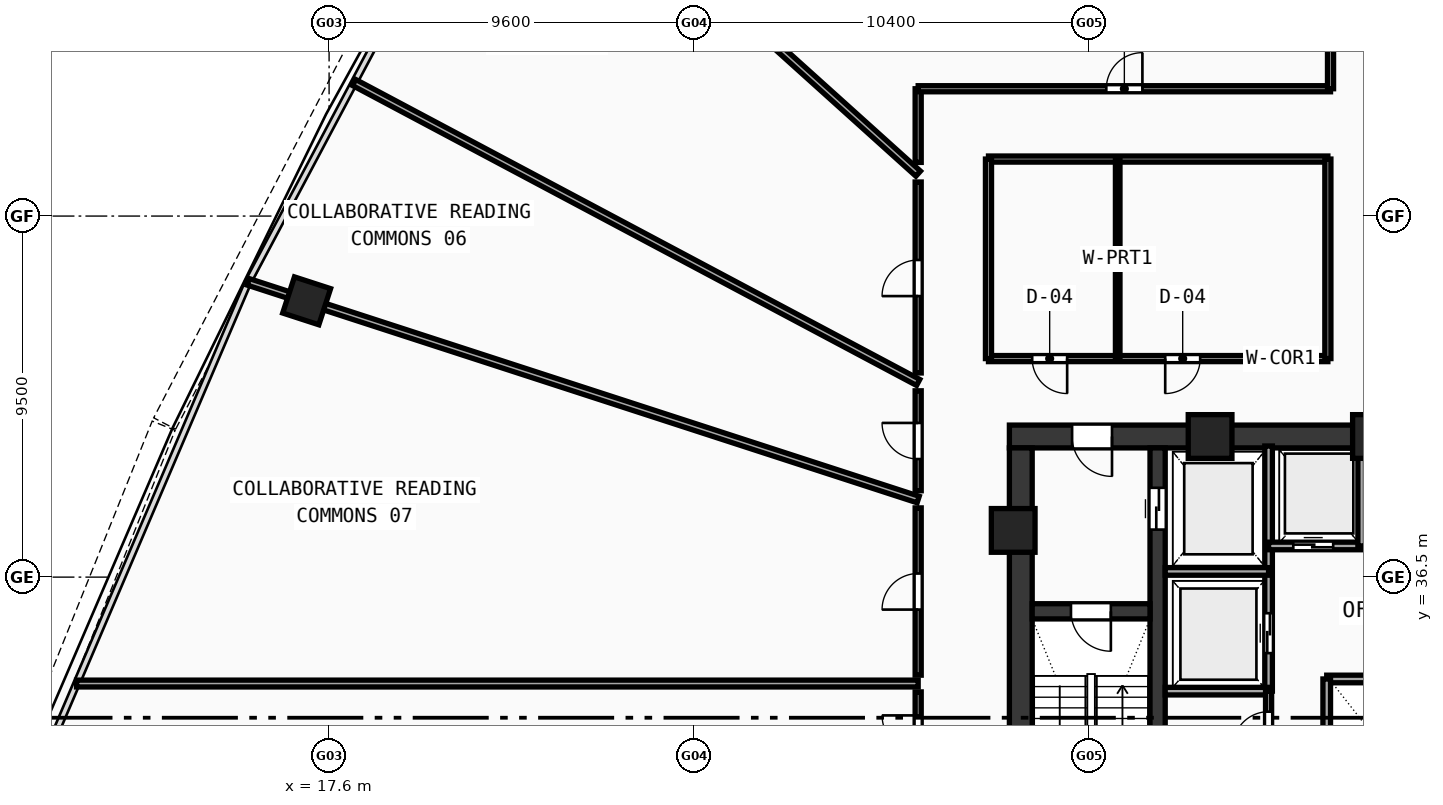
"""IFC4 building model, lengths in metres.
Left out: names, types, materials, properties, quantities, classifications, styles, units other than length and angle.
Written with IfcOpenShell. Run it as: python <this file> out.ifc"""

import sys

from ifc_helpers import new_model, si_unit, direction, frame, frame_2d, origin, origin_with_axes, origin_2d, place, context, subcontext, project, spatial, rectangle, hollow_rectangle, extrude, source, transform, mapped, element, fill, save


model = new_model("IFC4")
c1 = context("Model", 3, precision=1e-05, world=origin(), true_north=direction((0.0, 1.0)))
c2 = subcontext(c1, "Body", "Model", "MODEL_VIEW")
j1 = project(units=[si_unit("LENGTHUNIT", "METRE"), si_unit("PLANEANGLEUNIT", "RADIAN")], contexts=[c1])
p1 = place(None, origin())
s1 = spatial("IfcSite", under=j1, at=p1, CompositionType="ELEMENT")
p2 = place(p1, origin())
s2 = spatial("IfcBuilding", under=s1, at=p2, CompositionType="ELEMENT")
p3 = place(p2, frame((0.0, 0.0, 103.98)))
s3 = spatial("IfcBuildingStorey", under=s2, at=p3, CompositionType="ELEMENT", Elevation=103.98)
p4 = place(p3, frame((35.5, 40.2, 0.0), z_axis=(0.0, 0.0, 1.0), x_axis=(1.0, 0.0, 0.0)))
e1 = element("IfcWall", 1, at=p4, inside=s3, PredefinedType="SHEAR", context=c2, shape_type="SweptSolid", body=[
    extrude(rectangle(XDim=11.3, YDim=0.6, at=frame_2d((5.65, 0.0))), origin(), (0.0, 0.0, 1.0), 3.54),
])
p5 = place(p4, frame((1.65, 0.0, 0.0)))
e2 = element("IfcOpeningElement", 2, at=p5, cuts=e1, PredefinedType="OPENING", context=c2, shape_type="SweptSolid", body=[
    extrude(rectangle(XDim=1.05, YDim=2.1, at=frame_2d((0.525, 1.05))), frame((0.0, 0.31, 0.0), z_axis=(0.0, -1.0, 0.0), x_axis=(1.0, 0.0, 0.0)), (0.0, 0.0, 1.0), 0.62),
])
p6 = place(p3, frame((35.8, 27.8, 0.0), z_axis=(0.0, 0.0, 1.0), x_axis=(0.0, 1.0, 0.0)))
e3 = element("IfcWall", 3, at=p6, inside=s3, PredefinedType="SHEAR", context=c2, shape_type="SweptSolid", body=[
    extrude(rectangle(XDim=12.1, YDim=0.6, at=frame_2d((6.05, 0.0))), origin(), (0.0, 0.0, 1.0), 3.54),
])
p7 = place(p3, frame((39.4, 27.8, 0.0), z_axis=(0.0, 0.0, 1.0), x_axis=(0.0, 1.0, 0.0)))
e4 = element("IfcWall", 4, at=p7, inside=s3, PredefinedType="SHEAR", context=c2, shape_type="SweptSolid", body=[
    extrude(rectangle(XDim=12.1, YDim=0.4, at=frame_2d((6.05, 0.0))), origin(), (0.0, 0.0, 1.0), 3.54),
])
p8 = place(p7, frame((9.95, 0.0, 0.0)))
e5 = element("IfcOpeningElement", 5, at=p8, cuts=e4, PredefinedType="OPENING", context=c2, shape_type="SweptSolid", body=[
    extrude(rectangle(XDim=1.1, YDim=2.1, at=frame_2d((0.55, 1.05))), frame((0.0, 0.21, 0.0), z_axis=(0.0, -1.0, 0.0), x_axis=(1.0, 0.0, 0.0)), (0.0, 0.0, 1.0), 0.42),
])
p9 = place(p3, frame((36.1, 35.6, 0.0), z_axis=(0.0, 0.0, 1.0), x_axis=(1.0, 0.0, 0.0)))
e6 = element("IfcWall", 6, at=p9, inside=s3, PredefinedType="SHEAR", context=c2, shape_type="SweptSolid", body=[
    extrude(rectangle(XDim=3.1, YDim=0.4, at=frame_2d((1.55, 0.0))), origin(), (0.0, 0.0, 1.0), 3.54),
])
p10 = place(p9, frame((1.02, 0.0, 0.0)))
e7 = element("IfcOpeningElement", 7, at=p10, cuts=e6, PredefinedType="OPENING", context=c2, shape_type="SweptSolid", body=[
    extrude(rectangle(XDim=1.05, YDim=2.1, at=frame_2d((0.525, 1.05))), frame((0.0, 0.21, 0.0), z_axis=(0.0, -1.0, 0.0), x_axis=(1.0, 0.0, 0.0)), (0.0, 0.0, 1.0), 0.42),
])
m1 = source(origin(), c2, "Body", "SweptSolid", [
    extrude(hollow_rectangle(XDim=1.15, YDim=1.15, WallThickness=0.048, at=origin_2d()), origin(), (0.0, 0.0, 1.0), 3.8),
])
for number, where, z_axis, x_axis in (
    (8, (45.106, 40.2, -0.26), (0.0, 0.0, 1.0), (1.0, 0.0, 0.0)),
    (9, (40.781, 40.2, -0.26), (0.0, 0.0, 1.0), (1.0, 0.0, 0.0)),
    (10, (35.6, 37.729, -0.26), (0.0, 0.0, 1.0), (1.0, 0.0, 0.0)),
):
    element("IfcColumn", number, at=place(p3, frame(where, z_axis=z_axis, x_axis=x_axis)), inside=s3, PredefinedType="COLUMN", context=c2, shape_type="MappedRepresentation", body=[
        mapped(m1, transform((0.0, 0.0, 0.0), scale=1.0)),
    ])
m2 = source(origin(), c2, "Body", "SweptSolid", [
    extrude(hollow_rectangle(XDim=1.0, YDim=1.0, WallThickness=0.042, at=origin_2d()), origin(), (0.0, 0.0, 1.0), 3.8),
])
p11 = place(p3, frame((17.009, 43.77, -0.26), z_axis=(0.0, 0.0, 1.0), x_axis=(-0.309016994375, -0.951056516295, 0.0)))
e11 = element("IfcColumn", 11, at=p11, inside=s3, PredefinedType="COLUMN", context=c2, shape_type="MappedRepresentation", body=[
    mapped(m2, transform((0.0, 0.0, 0.0), scale=1.0)),
])
p12 = place(p3, frame((42.32, 33.5, 0.0), z_axis=(0.0, 0.0, 1.0), x_axis=(0.0, 1.0, 0.0)))
e12 = element("IfcWall", 12, at=p12, inside=s3, PredefinedType="SOLIDWALL", context=c2, shape_type="SweptSolid", body=[
    extrude(rectangle(XDim=6.45, YDim=0.2, at=frame_2d((3.225, 0.0))), origin(), (0.0, 0.0, 1.0), 3.54),
])
p13 = place(p12, frame((1.0, 0.0, 0.0)))
e13 = element("IfcOpeningElement", 13, at=p13, cuts=e12, PredefinedType="OPENING", context=c2, shape_type="SweptSolid", body=[
    extrude(rectangle(XDim=1.05, YDim=2.1, at=frame_2d((0.525, 1.05))), frame((0.0, 0.11, 0.0), z_axis=(0.0, -1.0, 0.0), x_axis=(1.0, 0.0, 0.0)), (0.0, 0.0, 1.0), 0.22),
])
for number, where, z_axis, x_axis in (
    (14, (39.6, 36.65, 0.0), (0.0, 0.0, 1.0), (1.0, 0.0, 0.0)),
    (15, (39.6, 33.5, 0.0), (0.0, 0.0, 1.0), (1.0, 0.0, 0.0)),
):
    element("IfcWall", number, at=place(p3, frame(where, z_axis=z_axis, x_axis=x_axis)), inside=s3, PredefinedType="SOLIDWALL", context=c2, shape_type="SweptSolid", body=[
        extrude(rectangle(XDim=2.72, YDim=0.2, at=frame_2d((1.36, 0.0))), origin(), (0.0, 0.0, 1.0), 3.54),
    ])
p14 = place(p3, frame((42.32, 37.32, 0.0), z_axis=(0.0, 0.0, 1.0), x_axis=(1.0, 0.0, 0.0)))
e16 = element("IfcWall", 16, at=p14, inside=s3, PredefinedType="SOLIDWALL", context=c2, shape_type="SweptSolid", body=[
    extrude(rectangle(XDim=4.73, YDim=0.2, at=frame_2d((2.365, 0.0))), origin(), (0.0, 0.0, 1.0), 3.54),
])
p15 = place(p14, frame((0.65, 0.0, 0.0)))
e17 = element("IfcOpeningElement", 17, at=p15, cuts=e16, PredefinedType="OPENING", context=c2, shape_type="SweptSolid", body=[
    extrude(rectangle(XDim=1.05, YDim=2.1, at=frame_2d((0.525, 1.05))), frame((0.0, 0.11, 0.0), z_axis=(0.0, -1.0, 0.0), x_axis=(1.0, 0.0, 0.0)), (0.0, 0.0, 1.0), 0.22),
])
p16 = place(p14, frame((2.95, 0.0, 0.0)))
e18 = element("IfcOpeningElement", 18, at=p16, cuts=e16, PredefinedType="OPENING", context=c2, shape_type="SweptSolid", body=[
    extrude(rectangle(XDim=1.05, YDim=2.1, at=frame_2d((0.525, 1.05))), frame((0.0, 0.11, 0.0), z_axis=(0.0, -1.0, 0.0), x_axis=(1.0, 0.0, 0.0)), (0.0, 0.0, 1.0), 0.22),
])
p17 = place(p3, frame((44.77, 37.32, 0.0), z_axis=(0.0, 0.0, 1.0), x_axis=(0.0, 1.0, 0.0)))
e19 = element("IfcWall", 19, at=p17, inside=s3, PredefinedType="SOLIDWALL", context=c2, shape_type="SweptSolid", body=[
    extrude(rectangle(XDim=2.63, YDim=0.2, at=frame_2d((1.315, 0.0))), origin(), (0.0, 0.0, 1.0), 3.54),
])
p18 = place(p3, frame((43.85, 33.82, 0.0), z_axis=(0.0, 0.0, 1.0), x_axis=(1.0, 0.0, 0.0)))
e20 = element("IfcWall", 20, at=p18, inside=s3, PredefinedType="SOLIDWALL", context=c2, shape_type="SweptSolid", body=[
    extrude(rectangle(XDim=9.83, YDim=0.2, at=frame_2d((4.915, 0.0))), origin(), (0.0, 0.0, 1.0), 3.54),
])
p19 = place(p3, frame((43.85, 27.6, 0.0), z_axis=(0.0, 0.0, 1.0), x_axis=(0.0, 1.0, 0.0)))
e21 = element("IfcWall", 21, at=p19, inside=s3, PredefinedType="SOLIDWALL", context=c2, shape_type="SweptSolid", body=[
    extrude(rectangle(XDim=6.22, YDim=0.2, at=frame_2d((3.11, 0.0))), origin(), (0.0, 0.0, 1.0), 3.54),
])
p20 = place(p19, frame((2.25, 0.0, 0.0)))
e22 = element("IfcOpeningElement", 22, at=p20, cuts=e21, PredefinedType="OPENING", context=c2, shape_type="SweptSolid", body=[
    extrude(rectangle(XDim=1.05, YDim=2.1, at=frame_2d((0.525, 1.05))), frame((0.0, 0.11, 0.0), z_axis=(0.0, -1.0, 0.0), x_axis=(1.0, 0.0, 0.0)), (0.0, 0.0, 1.0), 0.22),
])
p21 = place(p3, frame((42.32, 27.6, 0.0), z_axis=(0.0, 0.0, 1.0), x_axis=(0.0, 1.0, 0.0)))
e23 = element("IfcWall", 23, at=p21, inside=s3, PredefinedType="PARTITIONING", context=c2, shape_type="SweptSolid", body=[
    extrude(rectangle(XDim=5.9, YDim=0.16, at=frame_2d((2.95, 0.0))), origin(), (0.0, 0.0, 1.0), 3.54),
])
p22 = place(p21, frame((0.5, 0.0, 0.0)))
e24 = element("IfcOpeningElement", 24, at=p22, cuts=e23, PredefinedType="OPENING", context=c2, shape_type="SweptSolid", body=[
    extrude(rectangle(XDim=0.9, YDim=2.1, at=frame_2d((0.45, 1.05))), frame((0.0, 0.09, 0.0), z_axis=(0.0, -1.0, 0.0), x_axis=(1.0, 0.0, 0.0)), (0.0, 0.0, 1.0), 0.18),
])
p23 = place(p21, frame((2.45, 0.0, 0.0)))
e25 = element("IfcOpeningElement", 25, at=p23, cuts=e23, PredefinedType="OPENING", context=c2, shape_type="SweptSolid", body=[
    extrude(rectangle(XDim=0.9, YDim=2.1, at=frame_2d((0.45, 1.05))), frame((0.0, 0.09, 0.0), z_axis=(0.0, -1.0, 0.0), x_axis=(1.0, 0.0, 0.0)), (0.0, 0.0, 1.0), 0.18),
])
p24 = place(p21, frame((4.42, 0.0, 0.0)))
e26 = element("IfcOpeningElement", 26, at=p24, cuts=e23, PredefinedType="OPENING", context=c2, shape_type="SweptSolid", body=[
    extrude(rectangle(XDim=0.94, YDim=2.1, at=frame_2d((0.47, 1.05))), frame((0.0, 0.09, 0.0), z_axis=(0.0, -1.0, 0.0), x_axis=(1.0, 0.0, 0.0)), (0.0, 0.0, 1.0), 0.18),
])
p25 = place(p3, frame((34.95, 42.25, 0.0), z_axis=(0.0, 0.0, 1.0), x_axis=(1.0, 0.0, 0.0)))
e27 = element("IfcWall", 27, at=p25, inside=s3, PredefinedType="PARTITIONING", context=c2, shape_type="SweptSolid", body=[
    extrude(rectangle(XDim=8.93, YDim=0.16, at=frame_2d((4.465, 0.0))), origin(), (0.0, 0.0, 1.0), 2.84),
])
p26 = place(p25, frame((1.15, 0.0, 0.0)))
e28 = element("IfcOpeningElement", 28, at=p26, cuts=e27, PredefinedType="OPENING", context=c2, shape_type="SweptSolid", body=[
    extrude(rectangle(XDim=0.92, YDim=2.1, at=frame_2d((0.46, 1.05))), frame((0.0, 0.09, 0.0), z_axis=(0.0, -1.0, 0.0), x_axis=(1.0, 0.0, 0.0)), (0.0, 0.0, 1.0), 0.18),
])
p27 = place(p25, frame((4.65, 0.0, 0.0)))
e29 = element("IfcOpeningElement", 29, at=p27, cuts=e27, PredefinedType="OPENING", context=c2, shape_type="SweptSolid", body=[
    extrude(rectangle(XDim=0.92, YDim=2.1, at=frame_2d((0.46, 1.05))), frame((0.0, 0.09, 0.0), z_axis=(0.0, -1.0, 0.0), x_axis=(1.0, 0.0, 0.0)), (0.0, 0.0, 1.0), 0.18),
])
p28 = place(p3, frame((34.95, 47.5, 0.0), z_axis=(0.0, 0.0, 1.0), x_axis=(1.0, 0.0, 0.0)))
e30 = element("IfcWall", 30, at=p28, inside=s3, PredefinedType="PARTITIONING", context=c2, shape_type="SweptSolid", body=[
    extrude(rectangle(XDim=8.93, YDim=0.16, at=frame_2d((4.465, 0.0))), origin(), (0.0, 0.0, 1.0), 2.84),
])
for number, where, z_axis, x_axis in (
    (31, (34.95, 42.25, 0.0), (0.0, 0.0, 1.0), (0.0, 1.0, 0.0)),
    (32, (43.88, 42.25, 0.0), (0.0, 0.0, 1.0), (0.0, 1.0, 0.0)),
):
    element("IfcWall", number, at=place(p3, frame(where, z_axis=z_axis, x_axis=x_axis)), inside=s3, PredefinedType="PARTITIONING", context=c2, shape_type="SweptSolid", body=[
        extrude(rectangle(XDim=5.25, YDim=0.16, at=frame_2d((2.625, 0.0))), origin(), (0.0, 0.0, 1.0), 2.84),
    ])
p29 = place(p3, frame((38.35, 42.25, 0.0), z_axis=(0.0, 0.0, 1.0), x_axis=(0.0, 1.0, 0.0)))
e33 = element("IfcWall", 33, at=p29, inside=s3, PredefinedType="PARTITIONING", context=c2, shape_type="SweptSolid", body=[
    extrude(rectangle(XDim=5.25, YDim=0.12, at=frame_2d((2.625, 0.0))), origin(), (0.0, 0.0, 1.0), 2.84),
])
p30 = place(p3, frame((33.1, 47.116, 0.0), z_axis=(0.0, 0.0, 1.0), x_axis=(-0.7431435128, 0.669132064232, 0.0)))
e34 = element("IfcWall", 34, at=p30, inside=s3, PredefinedType="PARTITIONING", context=c2, shape_type="SweptSolid", body=[
    extrude(rectangle(XDim=14.669, YDim=0.18, at=frame_2d((7.334, 0.0))), origin(), (0.0, 0.0, 1.0), 2.84),
])
p31 = place(p3, frame((33.1, 41.623, 0.0), z_axis=(0.0, 0.0, 1.0), x_axis=(-0.88295130371, 0.469464583624, 0.0)))
e35 = element("IfcWall", 35, at=p31, inside=s3, PredefinedType="PARTITIONING", context=c2, shape_type="SweptSolid", body=[
    extrude(rectangle(XDim=16.809, YDim=0.18, at=frame_2d((8.404, 0.0))), origin(), (0.0, 0.0, 1.0), 2.84),
])
p32 = place(p3, frame((33.1, 38.541, 0.0), z_axis=(0.0, 0.0, 1.0), x_axis=(-0.951054685131, 0.309022630063, 0.0)))
e36 = element("IfcWall", 36, at=p32, inside=s3, PredefinedType="PARTITIONING", context=c2, shape_type="SweptSolid", body=[
    extrude(rectangle(XDim=18.534, YDim=0.18, at=frame_2d((9.267, 0.0))), origin(), (0.0, 0.0, 1.0), 2.84),
])
p33 = place(p3, frame((33.1, 33.7, 0.0), z_axis=(0.0, 0.0, 1.0), x_axis=(-1.0, 0.0, 0.0)))
e37 = element("IfcWall", 37, at=p33, inside=s3, PredefinedType="PARTITIONING", context=c2, shape_type="SweptSolid", body=[
    extrude(rectangle(XDim=22.145, YDim=0.18, at=frame_2d((11.073, 0.0))), origin(), (0.0, 0.0, 1.0), 2.84),
])
p34 = place(p3, frame((33.1, 31.292, 0.0), z_axis=(0.0, 0.0, 1.0), x_axis=(0.0, 1.0, 0.0)))
e38 = element("IfcWall", 38, at=p34, inside=s3, PredefinedType="PARTITIONING", context=c2, shape_type="SweptSolid", body=[
    extrude(rectangle(XDim=2.188, YDim=0.16, at=frame_2d((1.094, 0.0))), origin(), (0.0, 0.0, 1.0), 3.54),
])
p35 = place(p34, frame((0.619, 0.0, 0.0)))
e39 = element("IfcOpeningElement", 39, at=p35, cuts=e38, PredefinedType="OPENING", context=c2, shape_type="SweptSolid", body=[
    extrude(rectangle(XDim=0.95, YDim=2.1, at=frame_2d((0.475, 1.05))), frame((0.0, 0.09, 0.0), z_axis=(0.0, -1.0, 0.0), x_axis=(1.0, 0.0, 0.0)), (0.0, 0.0, 1.0), 0.18),
])
p36 = place(p3, frame((33.1, 33.92, 0.0), z_axis=(0.0, 0.0, 1.0), x_axis=(0.0, 1.0, 0.0)))
e40 = element("IfcWall", 40, at=p36, inside=s3, PredefinedType="PARTITIONING", context=c2, shape_type="SweptSolid", body=[
    extrude(rectangle(XDim=4.402, YDim=0.16, at=frame_2d((2.201, 0.0))), origin(), (0.0, 0.0, 1.0), 3.54),
])
p37 = place(p36, frame((1.726, 0.0, 0.0)))
e41 = element("IfcOpeningElement", 41, at=p37, cuts=e40, PredefinedType="OPENING", context=c2, shape_type="SweptSolid", body=[
    extrude(rectangle(XDim=0.95, YDim=2.1, at=frame_2d((0.475, 1.05))), frame((0.0, 0.09, 0.0), z_axis=(0.0, -1.0, 0.0), x_axis=(1.0, 0.0, 0.0)), (0.0, 0.0, 1.0), 0.18),
])
p38 = place(p3, frame((33.1, 38.773, 0.0), z_axis=(0.0, 0.0, 1.0), x_axis=(0.0, 1.0, 0.0)))
e42 = element("IfcWall", 42, at=p38, inside=s3, PredefinedType="PARTITIONING", context=c2, shape_type="SweptSolid", body=[
    extrude(rectangle(XDim=2.63, YDim=0.16, at=frame_2d((1.315, 0.0))), origin(), (0.0, 0.0, 1.0), 3.54),
])
p39 = place(p38, frame((0.834, 0.0, 0.0)))
e43 = element("IfcOpeningElement", 43, at=p39, cuts=e42, PredefinedType="OPENING", context=c2, shape_type="SweptSolid", body=[
    extrude(rectangle(XDim=0.95, YDim=2.1, at=frame_2d((0.475, 1.05))), frame((0.0, 0.09, 0.0), z_axis=(0.0, -1.0, 0.0), x_axis=(1.0, 0.0, 0.0)), (0.0, 0.0, 1.0), 0.18),
])
p40 = place(p3, frame((33.1, 41.872, 0.0), z_axis=(0.0, 0.0, 1.0), x_axis=(0.0, 1.0, 0.0)))
e44 = element("IfcWall", 44, at=p40, inside=s3, PredefinedType="PARTITIONING", context=c2, shape_type="SweptSolid", body=[
    extrude(rectangle(XDim=5.025, YDim=0.16, at=frame_2d((2.512, 0.0))), origin(), (0.0, 0.0, 1.0), 2.84),
])
p41 = place(p40, frame((2.023, 0.0, 0.0)))
e45 = element("IfcOpeningElement", 45, at=p41, cuts=e44, PredefinedType="OPENING", context=c2, shape_type="SweptSolid", body=[
    extrude(rectangle(XDim=0.95, YDim=2.1, at=frame_2d((0.475, 1.05))), frame((0.0, 0.09, 0.0), z_axis=(0.0, -1.0, 0.0), x_axis=(1.0, 0.0, 0.0)), (0.0, 0.0, 1.0), 0.18),
])
p42 = place(p3, frame((33.1, 47.412, 0.0), z_axis=(0.0, 0.0, 1.0), x_axis=(0.0, 1.0, 0.0)))
e46 = element("IfcWall", 46, at=p42, inside=s3, PredefinedType="PARTITIONING", context=c2, shape_type="SweptSolid", body=[
    extrude(rectangle(XDim=1.938, YDim=0.16, at=frame_2d((0.969, 0.0))), origin(), (0.0, 0.0, 1.0), 3.54),
])
p43 = place(p3, frame((33.1, 49.35, 0.0), z_axis=(0.0, 0.0, 1.0), x_axis=(1.0, 0.0, 0.0)))
e47 = element("IfcWall", 47, at=p43, inside=s3, PredefinedType="PARTITIONING", context=c2, shape_type="SweptSolid", body=[
    extrude(rectangle(XDim=10.85, YDim=0.16, at=frame_2d((5.425, 0.0))), origin(), (0.0, 0.0, 1.0), 2.84),
])
p44 = place(p43, frame((4.95, 0.0, 0.0)))
e48 = element("IfcOpeningElement", 48, at=p44, cuts=e47, PredefinedType="OPENING", context=c2, shape_type="SweptSolid", body=[
    extrude(rectangle(XDim=0.95, YDim=2.1, at=frame_2d((0.475, 1.05))), frame((0.0, 0.09, 0.0), z_axis=(0.0, -1.0, 0.0), x_axis=(1.0, 0.0, 0.0)), (0.0, 0.0, 1.0), 0.18),
])
p45 = place(p3, frame((43.95, 49.35, 0.0), z_axis=(0.0, 0.0, 1.0), x_axis=(0.0, 1.0, 0.0)))
e49 = element("IfcWall", 49, at=p45, inside=s3, PredefinedType="PARTITIONING", context=c2, shape_type="SweptSolid", body=[
    extrude(rectangle(XDim=6.43, YDim=0.16, at=frame_2d((3.215, 0.0))), origin(), (0.0, 0.0, 1.0), 3.14),
])
m3 = source(origin(), c2, "Body", "SweptSolid", [
    extrude(rectangle(XDim=1.05, YDim=2.1, at=frame_2d((0.525, 1.05))), frame((0.0, 0.025, 0.0), z_axis=(0.0, -1.0, 0.0), x_axis=(1.0, 0.0, 0.0)), (0.0, 0.0, 1.0), 0.05),
])
p46 = place(p10, frame((1.05, 0.0, 0.0), z_axis=(0.0, 0.0, 1.0), x_axis=(-1.0, 0.0, 0.0)))
e50 = element("IfcDoor", 50, at=p46, inside=s3, OperationType="SINGLE_SWING_LEFT", PredefinedType="DOOR", context=c2, shape_type="MappedRepresentation", body=[
    mapped(m3, transform((0.0, 0.0, 0.0), scale=1.0)),
])
fill(e7, e50)
p47 = place(p5, frame((1.05, 0.0, 0.0), z_axis=(0.0, 0.0, 1.0), x_axis=(-1.0, 0.0, 0.0)))
e51 = element("IfcDoor", 51, at=p47, inside=s3, OperationType="SINGLE_SWING_LEFT", PredefinedType="DOOR", context=c2, shape_type="MappedRepresentation", body=[
    mapped(m3, transform((0.0, 0.0, 0.0), scale=1.0)),
])
fill(e2, e51)
m4 = source(origin(), c2, "Body", "SweptSolid", [
    extrude(rectangle(XDim=1.1, YDim=2.1, at=frame_2d((0.55, 1.05))), frame((0.0, 0.025, 0.0), z_axis=(0.0, -1.0, 0.0), x_axis=(1.0, 0.0, 0.0)), (0.0, 0.0, 1.0), 0.05),
])
p48 = place(p8, frame((1.1, 0.0, 0.0), z_axis=(0.0, 0.0, 1.0), x_axis=(-1.0, 0.0, 0.0)))
e52 = element("IfcDoor", 52, at=p48, inside=s3, OperationType="DOUBLE_DOOR_SLIDING", PredefinedType="DOOR", context=c2, shape_type="MappedRepresentation", body=[
    mapped(m4, transform((0.0, 0.0, 0.0), scale=1.0)),
])
fill(e5, e52)
p49 = place(p13, origin_with_axes())
e53 = element("IfcDoor", 53, at=p49, inside=s3, OperationType="DOUBLE_DOOR_SLIDING", PredefinedType="DOOR", context=c2, shape_type="MappedRepresentation", body=[
    mapped(m3, transform((0.0, 0.0, 0.0), scale=1.0)),
])
fill(e13, e53)
p50 = place(p15, frame((1.05, 0.0, 0.0), z_axis=(0.0, 0.0, 1.0), x_axis=(-1.0, 0.0, 0.0)))
e54 = element("IfcDoor", 54, at=p50, inside=s3, OperationType="DOUBLE_DOOR_SLIDING", PredefinedType="DOOR", context=c2, shape_type="MappedRepresentation", body=[
    mapped(m3, transform((0.0, 0.0, 0.0), scale=1.0)),
])
fill(e17, e54)
m5 = source(origin(), c2, "Body", "SweptSolid", [
    extrude(rectangle(XDim=0.94, YDim=2.1, at=frame_2d((0.47, 1.05))), frame((0.0, 0.025, 0.0), z_axis=(0.0, -1.0, 0.0), x_axis=(1.0, 0.0, 0.0)), (0.0, 0.0, 1.0), 0.05),
])
p51 = place(p24, origin_with_axes())
e55 = element("IfcDoor", 55, at=p51, inside=s3, OperationType="SINGLE_SWING_LEFT", PredefinedType="DOOR", context=c2, shape_type="MappedRepresentation", body=[
    mapped(m5, transform((0.0, 0.0, 0.0), scale=1.0)),
])
fill(e26, e55)
m6 = source(origin(), c2, "Body", "SweptSolid", [
    extrude(rectangle(XDim=0.92, YDim=2.1, at=frame_2d((0.46, 1.05))), frame((0.0, 0.025, 0.0), z_axis=(0.0, -1.0, 0.0), x_axis=(1.0, 0.0, 0.0)), (0.0, 0.0, 1.0), 0.05),
])
p52 = place(p26, frame((0.92, 0.0, 0.0), z_axis=(0.0, 0.0, 1.0), x_axis=(-1.0, 0.0, 0.0)))
e56 = element("IfcDoor", 56, at=p52, inside=s3, OperationType="SINGLE_SWING_LEFT", PredefinedType="DOOR", context=c2, shape_type="MappedRepresentation", body=[
    mapped(m6, transform((0.0, 0.0, 0.0), scale=1.0)),
])
fill(e28, e56)
p53 = place(p27, frame((0.92, 0.0, 0.0), z_axis=(0.0, 0.0, 1.0), x_axis=(-1.0, 0.0, 0.0)))
e57 = element("IfcDoor", 57, at=p53, inside=s3, OperationType="SINGLE_SWING_RIGHT", PredefinedType="DOOR", context=c2, shape_type="MappedRepresentation", body=[
    mapped(m6, transform((0.0, 0.0, 0.0), scale=1.0)),
])
fill(e29, e57)
m7 = source(origin(), c2, "Body", "SweptSolid", [
    extrude(rectangle(XDim=0.95, YDim=2.1, at=frame_2d((0.475, 1.05))), frame((0.0, 0.025, 0.0), z_axis=(0.0, -1.0, 0.0), x_axis=(1.0, 0.0, 0.0)), (0.0, 0.0, 1.0), 0.05),
])
p54 = place(p44, origin_with_axes())
e58 = element("IfcDoor", 58, at=p54, inside=s3, OperationType="SINGLE_SWING_RIGHT", PredefinedType="DOOR", context=c2, shape_type="MappedRepresentation", body=[
    mapped(m7, transform((0.0, 0.0, 0.0), scale=1.0)),
])
fill(e48, e58)
p55 = place(p41, origin_with_axes())
e59 = element("IfcDoor", 59, at=p55, inside=s3, OperationType="SINGLE_SWING_LEFT", PredefinedType="DOOR", context=c2, shape_type="MappedRepresentation", body=[
    mapped(m7, transform((0.0, 0.0, 0.0), scale=1.0)),
])
fill(e45, e59)
p56 = place(p39, origin_with_axes())
e60 = element("IfcDoor", 60, at=p56, inside=s3, OperationType="SINGLE_SWING_RIGHT", PredefinedType="DOOR", context=c2, shape_type="MappedRepresentation", body=[
    mapped(m7, transform((0.0, 0.0, 0.0), scale=1.0)),
])
fill(e43, e60)
p57 = place(p37, origin_with_axes())
e61 = element("IfcDoor", 61, at=p57, inside=s3, OperationType="SINGLE_SWING_LEFT", PredefinedType="DOOR", context=c2, shape_type="MappedRepresentation", body=[
    mapped(m7, transform((0.0, 0.0, 0.0), scale=1.0)),
])
fill(e41, e61)
p58 = place(p35, origin_with_axes())
e62 = element("IfcDoor", 62, at=p58, inside=s3, OperationType="SINGLE_SWING_RIGHT", PredefinedType="DOOR", context=c2, shape_type="MappedRepresentation", body=[
    mapped(m7, transform((0.0, 0.0, 0.0), scale=1.0)),
])
fill(e39, e62)
save(model, sys.argv[1])
